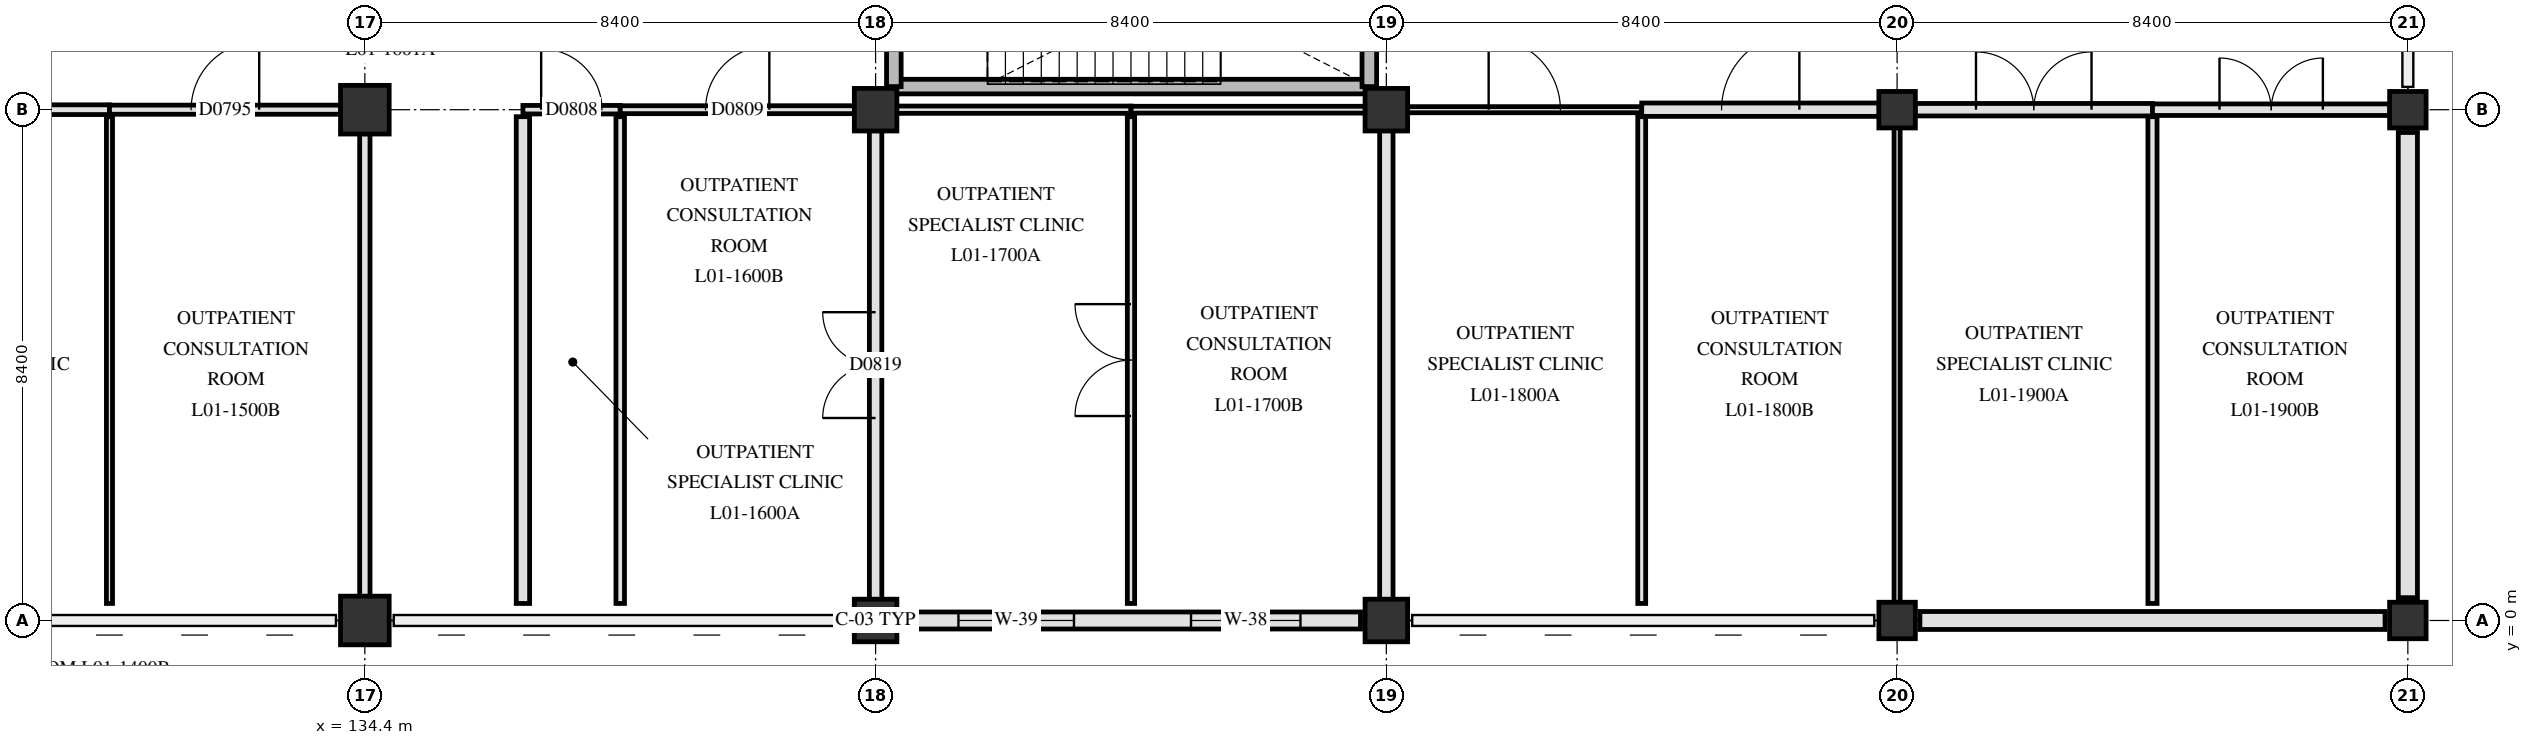
"""IFC4 building model, lengths in metres.
Left out: names, types, materials, properties, quantities, classifications, styles, units other than length and angle.
Written with IfcOpenShell. Run it as: python <this file> out.ifc"""

import sys

from ifc_helpers import new_model, si_unit, direction, frame, frame_2d, origin, origin_2d, place, context, subcontext, project, spatial, rectangle, extrude, element, fill, save


model = new_model("IFC4")
c1 = context("Model", 3, precision=1e-05, world=origin(), true_north=direction((0.0, 1.0)))
c2 = subcontext(c1, "Body", "Model", "MODEL_VIEW")
j1 = project(units=[si_unit("LENGTHUNIT", "METRE"), si_unit("PLANEANGLEUNIT", "RADIAN")], contexts=[c1])
p1 = place(None, origin())
s1 = spatial("IfcSite", under=j1, at=p1, CompositionType="ELEMENT")
p2 = place(p1, origin())
s2 = spatial("IfcBuilding", under=s1, at=p2, CompositionType="ELEMENT")
p3 = place(p2, frame((0.0, 0.0, 4.8)))
s3 = spatial("IfcBuildingStorey", under=s2, at=p3, CompositionType="ELEMENT", Elevation=4.8)
for number, where, z_axis, x_axis in (
    (1, (134.4, 0.0, 0.0), (0.0, 0.0, 1.0), (1.0, 0.0, 0.0)),
    (2, (134.4, 8.4, 0.0), (0.0, 0.0, 1.0), (1.0, 0.0, 0.0)),
):
    element("IfcColumn", number, at=place(p3, frame(where, z_axis=z_axis, x_axis=x_axis)), inside=s3, PredefinedType="COLUMN", context=c2, shape_type="SweptSolid", body=[
        extrude(rectangle(XDim=0.8, YDim=0.8, at=origin_2d()), origin(), (0.0, 0.0, 1.0), 4.5),
    ])
for number, where, z_axis, x_axis in (
    (3, (142.8, 0.0, 0.0), (0.0, 0.0, 1.0), (1.0, 0.0, 0.0)),
    (4, (142.8, 8.4, 0.0), (0.0, 0.0, 1.0), (1.0, 0.0, 0.0)),
    (5, (151.2, 0.0, 0.0), (0.0, 0.0, 1.0), (1.0, 0.0, 0.0)),
    (6, (151.2, 8.4, 0.0), (0.0, 0.0, 1.0), (1.0, 0.0, 0.0)),
):
    element("IfcColumn", number, at=place(p3, frame(where, z_axis=z_axis, x_axis=x_axis)), inside=s3, PredefinedType="COLUMN", context=c2, shape_type="SweptSolid", body=[
        extrude(rectangle(XDim=0.7, YDim=0.7, at=origin_2d()), origin(), (0.0, 0.0, 1.0), 4.5),
    ])
for number, where, z_axis, x_axis in (
    (7, (159.6, 0.0, 0.0), (0.0, 0.0, 1.0), (1.0, 0.0, 0.0)),
    (8, (159.6, 8.4, 0.0), (0.0, 0.0, 1.0), (1.0, 0.0, 0.0)),
    (9, (168.0, 0.0, 0.0), (0.0, 0.0, 1.0), (1.0, 0.0, 0.0)),
    (10, (168.0, 8.4, 0.0), (0.0, 0.0, 1.0), (1.0, 0.0, 0.0)),
):
    element("IfcColumn", number, at=place(p3, frame(where, z_axis=z_axis, x_axis=x_axis)), inside=s3, PredefinedType="COLUMN", context=c2, shape_type="SweptSolid", body=[
        extrude(rectangle(XDim=0.6, YDim=0.6, at=origin_2d()), origin(), (0.0, 0.0, 1.0), 4.5),
    ])
p4 = place(p3, frame((168.0, 8.025, 0.0), z_axis=(0.0, 0.0, 1.0), x_axis=(0.0, -1.0, 0.0)))
e11 = element("IfcWall", 11, at=p4, inside=s3, PredefinedType="SOLIDWALL", context=c2, shape_type="SweptSolid", body=[
    extrude(rectangle(XDim=7.65, YDim=0.315, at=frame_2d((3.825, 0.0))), origin(), (0.0, 0.0, 1.0), 3.44),
])
p5 = place(p3, frame((167.625, 0.0, 0.0), z_axis=(0.0, 0.0, 1.0), x_axis=(-1.0, 0.0, 0.0)))
e12 = element("IfcWall", 12, at=p5, inside=s3, PredefinedType="SOLIDWALL", context=c2, shape_type="SweptSolid", body=[
    extrude(rectangle(XDim=7.65, YDim=0.295, at=frame_2d((3.825, 0.0))), origin(), (0.0, 0.0, 1.0), 3.44),
])
p6 = place(p3, frame((150.775, 0.0, 0.0), z_axis=(0.0, 0.0, 1.0), x_axis=(-1.0, 0.0, 0.0)))
e13 = element("IfcWall", 13, at=p6, inside=s3, PredefinedType="SOLIDWALL", context=c2, shape_type="SweptSolid", body=[
    extrude(rectangle(XDim=7.55, YDim=0.28, at=frame_2d((3.775, 0.0))), origin(), (0.0, 0.0, 1.0), 3.44),
])
p7 = place(p6, frame((0.988, 0.0, 0.85)))
e14 = element("IfcOpeningElement", 14, at=p7, cuts=e13, PredefinedType="OPENING", context=c2, shape_type="SweptSolid", body=[
    extrude(rectangle(XDim=1.8, YDim=1.66, at=frame_2d((0.9, 0.83))), frame((0.0, 0.15, 0.0), z_axis=(0.0, -1.0, 0.0), x_axis=(1.0, 0.0, 0.0)), (0.0, 0.0, 1.0), 0.3),
])
p8 = place(p6, frame((4.712, 0.0, 0.85)))
e15 = element("IfcOpeningElement", 15, at=p8, cuts=e13, PredefinedType="OPENING", context=c2, shape_type="SweptSolid", body=[
    extrude(rectangle(XDim=1.9, YDim=1.66, at=frame_2d((0.95, 0.83))), frame((0.0, 0.15, 0.0), z_axis=(0.0, -1.0, 0.0), x_axis=(1.0, 0.0, 0.0)), (0.0, 0.0, 1.0), 0.3),
])
p9 = place(p3, frame((143.1, 8.78, 0.0), z_axis=(0.0, 0.0, 1.0), x_axis=(1.0, 0.0, 0.0)))
e16 = element("IfcWall", 16, at=p9, inside=s3, PredefinedType="SHEAR", context=c2, shape_type="SweptSolid", body=[
    extrude(rectangle(XDim=7.82, YDim=0.24, at=frame_2d((3.91, 0.0))), origin(), (0.0, 0.0, 1.0), 4.15),
])
for number, where, z_axis, x_axis in (
    (17, (143.1, 8.78, 0.0), (0.0, 0.0, 1.0), (0.0, 1.0, 0.0)),
    (18, (150.92, 8.78, 0.0), (0.0, 0.0, 1.0), (0.0, 1.0, 0.0)),
):
    element("IfcWall", number, at=place(p3, frame(where, z_axis=z_axis, x_axis=x_axis)), inside=s3, PredefinedType="SHEAR", context=c2, shape_type="SweptSolid", body=[
        extrude(rectangle(XDim=3.32, YDim=0.24, at=frame_2d((1.66, 0.0))), origin(), (0.0, 0.0, 1.0), 4.15),
    ])
p10 = place(p3, frame((126.395, 8.4, 0.0), z_axis=(0.0, 0.0, 1.0), x_axis=(1.0, 0.0, 0.0)))
e19 = element("IfcWall", 19, at=p10, inside=s3, PredefinedType="PARTITIONING", context=c2, shape_type="SweptSolid", body=[
    extrude(rectangle(XDim=3.805, YDim=0.16, at=frame_2d((1.902, 0.0))), origin(), (0.0, 0.0, 1.0), 3.54),
])
p11 = place(p10, frame((1.413, 0.0, 0.0)))
e20 = element("IfcOpeningElement", 20, at=p11, cuts=e19, PredefinedType="OPENING", context=c2, shape_type="SweptSolid", body=[
    extrude(rectangle(XDim=0.98, YDim=2.12, at=frame_2d((0.49, 1.06))), frame((0.0, 0.09, 0.0), z_axis=(0.0, -1.0, 0.0), x_axis=(1.0, 0.0, 0.0)), (0.0, 0.0, 1.0), 0.18),
])
p12 = place(p3, frame((130.2, 8.4, 0.0), z_axis=(0.0, 0.0, 1.0), x_axis=(1.0, 0.0, 0.0)))
e21 = element("IfcWall", 21, at=p12, inside=s3, PredefinedType="PARTITIONING", context=c2, shape_type="SweptSolid", body=[
    extrude(rectangle(XDim=3.805, YDim=0.15, at=frame_2d((1.902, 0.0))), origin(), (0.0, 0.0, 1.0), 3.54),
])
p13 = place(p12, frame((1.343, 0.0, 0.0)))
e22 = element("IfcOpeningElement", 22, at=p13, cuts=e21, PredefinedType="OPENING", context=c2, shape_type="SweptSolid", body=[
    extrude(rectangle(XDim=1.12, YDim=2.18, at=frame_2d((0.56, 1.09))), frame((0.0, 0.085, 0.0), z_axis=(0.0, -1.0, 0.0), x_axis=(1.0, 0.0, 0.0)), (0.0, 0.0, 1.0), 0.17),
])
p14 = place(p3, frame((137.0, 8.4, 0.0), z_axis=(0.0, 0.0, 1.0), x_axis=(1.0, 0.0, 0.0)))
e23 = element("IfcWall", 23, at=p14, inside=s3, PredefinedType="PARTITIONING", context=c2, shape_type="SweptSolid", body=[
    extrude(rectangle(XDim=1.6, YDim=0.14, at=frame_2d((0.8, 0.0))), origin(), (0.0, 0.0, 1.0), 3.54),
])
p15 = place(p14, frame((0.3, 0.0, 0.0)))
e24 = element("IfcOpeningElement", 24, at=p15, cuts=e23, PredefinedType="OPENING", context=c2, shape_type="SweptSolid", body=[
    extrude(rectangle(XDim=1.0, YDim=2.15, at=frame_2d((0.5, 1.075))), frame((0.0, 0.08, 0.0), z_axis=(0.0, -1.0, 0.0), x_axis=(1.0, 0.0, 0.0)), (0.0, 0.0, 1.0), 0.16),
])
p16 = place(p3, frame((138.6, 8.4, 0.0), z_axis=(0.0, 0.0, 1.0), x_axis=(1.0, 0.0, 0.0)))
e25 = element("IfcWall", 25, at=p16, inside=s3, PredefinedType="PARTITIONING", context=c2, shape_type="SweptSolid", body=[
    extrude(rectangle(XDim=3.855, YDim=0.13, at=frame_2d((1.927, 0.0))), origin(), (0.0, 0.0, 1.0), 3.54),
])
p17 = place(p16, frame((1.403, 0.0, 0.0)))
e26 = element("IfcOpeningElement", 26, at=p17, cuts=e25, PredefinedType="OPENING", context=c2, shape_type="SweptSolid", body=[
    extrude(rectangle(XDim=1.05, YDim=2.15, at=frame_2d((0.525, 1.075))), frame((0.0, 0.075, 0.0), z_axis=(0.0, -1.0, 0.0), x_axis=(1.0, 0.0, 0.0)), (0.0, 0.0, 1.0), 0.15),
])
p18 = place(p3, frame((143.145, 8.4, 0.0), z_axis=(0.0, 0.0, 1.0), x_axis=(1.0, 0.0, 0.0)))
e27 = element("IfcWall", 27, at=p18, inside=s3, PredefinedType="PARTITIONING", context=c2, shape_type="SweptSolid", body=[
    extrude(rectangle(XDim=3.855, YDim=0.12, at=frame_2d((1.927, 0.0))), origin(), (0.0, 0.0, 1.0), 3.54),
])
p19 = place(p3, frame((147.0, 8.4, 0.0), z_axis=(0.0, 0.0, 1.0), x_axis=(1.0, 0.0, 0.0)))
e28 = element("IfcWall", 28, at=p19, inside=s3, PredefinedType="PARTITIONING", context=c2, shape_type="SweptSolid", body=[
    extrude(rectangle(XDim=3.855, YDim=0.112, at=frame_2d((1.927, 0.0))), origin(), (0.0, 0.0, 1.0), 3.54),
])
p20 = place(p3, frame((151.545, 8.4, 0.0), z_axis=(0.0, 0.0, 1.0), x_axis=(1.0, 0.0, 0.0)))
e29 = element("IfcWall", 29, at=p20, inside=s3, PredefinedType="PARTITIONING", context=c2, shape_type="SweptSolid", body=[
    extrude(rectangle(XDim=3.855, YDim=0.1, at=frame_2d((1.927, 0.0))), origin(), (0.0, 0.0, 1.0), 3.54),
])
p21 = place(p20, frame((1.337, 0.0, 0.0)))
e30 = element("IfcOpeningElement", 30, at=p21, cuts=e29, PredefinedType="OPENING", context=c2, shape_type="SweptSolid", body=[
    extrude(rectangle(XDim=1.18, YDim=2.18, at=frame_2d((0.59, 1.09))), frame((0.0, 0.06, 0.0), z_axis=(0.0, -1.0, 0.0), x_axis=(1.0, 0.0, 0.0)), (0.0, 0.0, 1.0), 0.12),
])
p22 = place(p3, frame((155.4, 8.4, 0.0), z_axis=(0.0, 0.0, 1.0), x_axis=(1.0, 0.0, 0.0)))
e31 = element("IfcWall", 31, at=p22, inside=s3, PredefinedType="PARTITIONING", context=c2, shape_type="SweptSolid", body=[
    extrude(rectangle(XDim=3.905, YDim=0.22, at=frame_2d((1.953, 0.0))), origin(), (0.0, 0.0, 1.0), 3.54),
])
p23 = place(p22, frame((1.312, 0.0, 0.0)))
e32 = element("IfcOpeningElement", 32, at=p23, cuts=e31, PredefinedType="OPENING", context=c2, shape_type="SweptSolid", body=[
    extrude(rectangle(XDim=1.28, YDim=2.18, at=frame_2d((0.64, 1.09))), frame((0.0, 0.12, 0.0), z_axis=(0.0, -1.0, 0.0), x_axis=(1.0, 0.0, 0.0)), (0.0, 0.0, 1.0), 0.24),
])
p24 = place(p3, frame((159.895, 8.4, 0.0), z_axis=(0.0, 0.0, 1.0), x_axis=(1.0, 0.0, 0.0)))
e33 = element("IfcWall", 33, at=p24, inside=s3, PredefinedType="PARTITIONING", context=c2, shape_type="SweptSolid", body=[
    extrude(rectangle(XDim=3.905, YDim=0.205, at=frame_2d((1.953, 0.0))), origin(), (0.0, 0.0, 1.0), 3.54),
])
p25 = place(p24, frame((1.002, 0.0, 0.0)))
e34 = element("IfcOpeningElement", 34, at=p25, cuts=e33, PredefinedType="OPENING", context=c2, shape_type="SweptSolid", body=[
    extrude(rectangle(XDim=1.9, YDim=2.3, at=frame_2d((0.95, 1.15))), frame((0.0, 0.113, 0.0), z_axis=(0.0, -1.0, 0.0), x_axis=(1.0, 0.0, 0.0)), (0.0, 0.0, 1.0), 0.225),
])
p26 = place(p3, frame((163.8, 8.4, 0.0), z_axis=(0.0, 0.0, 1.0), x_axis=(1.0, 0.0, 0.0)))
e35 = element("IfcWall", 35, at=p26, inside=s3, PredefinedType="PARTITIONING", context=c2, shape_type="SweptSolid", body=[
    extrude(rectangle(XDim=3.905, YDim=0.19, at=frame_2d((1.953, 0.0))), origin(), (0.0, 0.0, 1.0), 3.54),
])
p27 = place(p26, frame((1.103, 0.0, 0.0)))
e36 = element("IfcOpeningElement", 36, at=p27, cuts=e35, PredefinedType="OPENING", context=c2, shape_type="SweptSolid", body=[
    extrude(rectangle(XDim=1.7, YDim=2.25, at=frame_2d((0.85, 1.125))), frame((0.0, 0.105, 0.0), z_axis=(0.0, -1.0, 0.0), x_axis=(1.0, 0.0, 0.0)), (0.0, 0.0, 1.0), 0.21),
])
p28 = place(p3, frame((130.2, 0.28, 0.0), z_axis=(0.0, 0.0, 1.0), x_axis=(0.0, 1.0, 0.0)))
e37 = element("IfcWall", 37, at=p28, inside=s3, PredefinedType="PARTITIONING", context=c2, shape_type="SweptSolid", body=[
    extrude(rectangle(XDim=8.005, YDim=0.1, at=frame_2d((4.002, 0.0))), origin(), (0.0, 0.0, 1.0), 3.54),
])
p29 = place(p3, frame((134.4, 0.395, 0.0), z_axis=(0.0, 0.0, 1.0), x_axis=(0.0, 1.0, 0.0)))
e38 = element("IfcWall", 38, at=p29, inside=s3, PredefinedType="PARTITIONING", context=c2, shape_type="SweptSolid", body=[
    extrude(rectangle(XDim=7.61, YDim=0.17, at=frame_2d((3.805, 0.0))), origin(), (0.0, 0.0, 1.0), 3.59),
])
p30 = place(p3, frame((137.0, 0.28, 0.0), z_axis=(0.0, 0.0, 1.0), x_axis=(0.0, 1.0, 0.0)))
e39 = element("IfcWall", 39, at=p30, inside=s3, PredefinedType="PARTITIONING", context=c2, shape_type="SweptSolid", body=[
    extrude(rectangle(XDim=8.005, YDim=0.22, at=frame_2d((4.002, 0.0))), origin(), (0.0, 0.0, 1.0), 3.54),
])
p31 = place(p3, frame((138.6, 0.28, 0.0), z_axis=(0.0, 0.0, 1.0), x_axis=(0.0, 1.0, 0.0)))
e40 = element("IfcWall", 40, at=p31, inside=s3, PredefinedType="PARTITIONING", context=c2, shape_type="SweptSolid", body=[
    extrude(rectangle(XDim=8.005, YDim=0.14, at=frame_2d((4.002, 0.0))), origin(), (0.0, 0.0, 1.0), 3.54),
])
p32 = place(p3, frame((142.8, 0.345, 0.0), z_axis=(0.0, 0.0, 1.0), x_axis=(0.0, 1.0, 0.0)))
e41 = element("IfcWall", 41, at=p32, inside=s3, PredefinedType="PARTITIONING", context=c2, shape_type="SweptSolid", body=[
    extrude(rectangle(XDim=7.71, YDim=0.205, at=frame_2d((3.855, 0.0))), origin(), (0.0, 0.0, 1.0), 3.59),
])
p33 = place(p32, frame((2.985, 0.0, 0.0)))
e42 = element("IfcOpeningElement", 42, at=p33, cuts=e41, PredefinedType="OPENING", context=c2, shape_type="SweptSolid", body=[
    extrude(rectangle(XDim=1.74, YDim=2.24, at=frame_2d((0.87, 1.12))), frame((0.0, 0.113, 0.0), z_axis=(0.0, -1.0, 0.0), x_axis=(1.0, 0.0, 0.0)), (0.0, 0.0, 1.0), 0.225),
])
p34 = place(p3, frame((147.0, 0.28, 0.0), z_axis=(0.0, 0.0, 1.0), x_axis=(0.0, 1.0, 0.0)))
e43 = element("IfcWall", 43, at=p34, inside=s3, PredefinedType="PARTITIONING", context=c2, shape_type="SweptSolid", body=[
    extrude(rectangle(XDim=8.005, YDim=0.12, at=frame_2d((4.002, 0.0))), origin(), (0.0, 0.0, 1.0), 3.54),
])
p35 = place(p34, frame((3.083, 0.0, 0.0)))
e44 = element("IfcOpeningElement", 44, at=p35, cuts=e43, PredefinedType="OPENING", context=c2, shape_type="SweptSolid", body=[
    extrude(rectangle(XDim=1.84, YDim=2.28, at=frame_2d((0.92, 1.14))), frame((0.0, 0.07, 0.0), z_axis=(0.0, -1.0, 0.0), x_axis=(1.0, 0.0, 0.0)), (0.0, 0.0, 1.0), 0.14),
])
p36 = place(p3, frame((151.2, 0.345, 0.0), z_axis=(0.0, 0.0, 1.0), x_axis=(0.0, 1.0, 0.0)))
e45 = element("IfcWall", 45, at=p36, inside=s3, PredefinedType="PARTITIONING", context=c2, shape_type="SweptSolid", body=[
    extrude(rectangle(XDim=7.71, YDim=0.22, at=frame_2d((3.855, 0.0))), origin(), (0.0, 0.0, 1.0), 3.59),
])
p37 = place(p3, frame((155.4, 0.28, 0.0), z_axis=(0.0, 0.0, 1.0), x_axis=(0.0, 1.0, 0.0)))
e46 = element("IfcWall", 46, at=p37, inside=s3, PredefinedType="PARTITIONING", context=c2, shape_type="SweptSolid", body=[
    extrude(rectangle(XDim=8.005, YDim=0.13, at=frame_2d((4.002, 0.0))), origin(), (0.0, 0.0, 1.0), 3.54),
])
p38 = place(p3, frame((159.6, 0.295, 0.0), z_axis=(0.0, 0.0, 1.0), x_axis=(0.0, 1.0, 0.0)))
e47 = element("IfcWall", 47, at=p38, inside=s3, PredefinedType="PARTITIONING", context=c2, shape_type="SweptSolid", body=[
    extrude(rectangle(XDim=7.81, YDim=0.1, at=frame_2d((3.905, 0.0))), origin(), (0.0, 0.0, 1.0), 3.59),
])
p39 = place(p3, frame((163.8, 0.28, 0.0), z_axis=(0.0, 0.0, 1.0), x_axis=(0.0, 1.0, 0.0)))
e48 = element("IfcWall", 48, at=p39, inside=s3, PredefinedType="PARTITIONING", context=c2, shape_type="SweptSolid", body=[
    extrude(rectangle(XDim=8.005, YDim=0.15, at=frame_2d((4.002, 0.0))), origin(), (0.0, 0.0, 1.0), 3.54),
])
p40 = place(p7, origin())
e49 = element("IfcWindow", 49, at=p40, inside=s3, PartitioningType="SINGLE_PANEL", PredefinedType="WINDOW", context=c2, shape_type="SweptSolid", body=[
    extrude(rectangle(XDim=1.8, YDim=1.66, at=frame_2d((0.9, 0.83))), frame((0.0, 0.03, 0.0), z_axis=(0.0, -1.0, 0.0), x_axis=(1.0, 0.0, 0.0)), (0.0, 0.0, 1.0), 0.06),
])
fill(e14, e49)
p41 = place(p8, origin())
e50 = element("IfcWindow", 50, at=p41, inside=s3, PartitioningType="SINGLE_PANEL", PredefinedType="WINDOW", context=c2, shape_type="SweptSolid", body=[
    extrude(rectangle(XDim=1.9, YDim=1.66, at=frame_2d((0.95, 0.83))), frame((0.0, 0.03, 0.0), z_axis=(0.0, -1.0, 0.0), x_axis=(1.0, 0.0, 0.0)), (0.0, 0.0, 1.0), 0.06),
])
fill(e15, e50)
p42 = place(p13, origin())
e51 = element("IfcDoor", 51, at=p42, inside=s3, OperationType="SINGLE_SWING_RIGHT", PredefinedType="DOOR", context=c2, shape_type="SweptSolid", body=[
    extrude(rectangle(XDim=1.12, YDim=2.18, at=frame_2d((0.56, 1.09))), frame((0.0, 0.025, 0.0), z_axis=(0.0, -1.0, 0.0), x_axis=(1.0, 0.0, 0.0)), (0.0, 0.0, 1.0), 0.05),
])
fill(e22, e51)
p43 = place(p15, origin())
e52 = element("IfcDoor", 52, at=p43, inside=s3, OperationType="SINGLE_SWING_LEFT", PredefinedType="DOOR", context=c2, shape_type="SweptSolid", body=[
    extrude(rectangle(XDim=1.0, YDim=2.15, at=frame_2d((0.5, 1.075))), frame((0.0, 0.025, 0.0), z_axis=(0.0, -1.0, 0.0), x_axis=(1.0, 0.0, 0.0)), (0.0, 0.0, 1.0), 0.05),
])
fill(e24, e52)
p44 = place(p17, origin())
e53 = element("IfcDoor", 53, at=p44, inside=s3, OperationType="SINGLE_SWING_RIGHT", PredefinedType="DOOR", context=c2, shape_type="SweptSolid", body=[
    extrude(rectangle(XDim=1.05, YDim=2.15, at=frame_2d((0.525, 1.075))), frame((0.0, 0.025, 0.0), z_axis=(0.0, -1.0, 0.0), x_axis=(1.0, 0.0, 0.0)), (0.0, 0.0, 1.0), 0.05),
])
fill(e26, e53)
p45 = place(p33, origin())
e54 = element("IfcDoor", 54, at=p45, inside=s3, OperationType="DOUBLE_SWING_RIGHT", PredefinedType="DOOR", context=c2, shape_type="SweptSolid", body=[
    extrude(rectangle(XDim=1.74, YDim=2.24, at=frame_2d((0.87, 1.12))), frame((0.0, 0.025, 0.0), z_axis=(0.0, -1.0, 0.0), x_axis=(1.0, 0.0, 0.0)), (0.0, 0.0, 1.0), 0.05),
])
fill(e42, e54)
p46 = place(p35, origin())
e55 = element("IfcDoor", 55, at=p46, inside=s3, OperationType="DOUBLE_SWING_LEFT", PredefinedType="DOOR", context=c2, shape_type="SweptSolid", body=[
    extrude(rectangle(XDim=1.84, YDim=2.28, at=frame_2d((0.92, 1.14))), frame((0.0, 0.025, 0.0), z_axis=(0.0, -1.0, 0.0), x_axis=(1.0, 0.0, 0.0)), (0.0, 0.0, 1.0), 0.05),
])
fill(e44, e55)
p47 = place(p21, origin())
e56 = element("IfcDoor", 56, at=p47, inside=s3, OperationType="SINGLE_SWING_LEFT", PredefinedType="DOOR", context=c2, shape_type="SweptSolid", body=[
    extrude(rectangle(XDim=1.18, YDim=2.18, at=frame_2d((0.59, 1.09))), frame((0.0, 0.025, 0.0), z_axis=(0.0, -1.0, 0.0), x_axis=(1.0, 0.0, 0.0)), (0.0, 0.0, 1.0), 0.05),
])
fill(e30, e56)
p48 = place(p23, origin())
e57 = element("IfcDoor", 57, at=p48, inside=s3, OperationType="SINGLE_SWING_RIGHT", PredefinedType="DOOR", context=c2, shape_type="SweptSolid", body=[
    extrude(rectangle(XDim=1.28, YDim=2.18, at=frame_2d((0.64, 1.09))), frame((0.0, 0.025, 0.0), z_axis=(0.0, -1.0, 0.0), x_axis=(1.0, 0.0, 0.0)), (0.0, 0.0, 1.0), 0.05),
])
fill(e32, e57)
p49 = place(p25, origin())
e58 = element("IfcDoor", 58, at=p49, inside=s3, OperationType="DOUBLE_SWING_LEFT", PredefinedType="DOOR", context=c2, shape_type="SweptSolid", body=[
    extrude(rectangle(XDim=1.9, YDim=2.3, at=frame_2d((0.95, 1.15))), frame((0.0, 0.025, 0.0), z_axis=(0.0, -1.0, 0.0), x_axis=(1.0, 0.0, 0.0)), (0.0, 0.0, 1.0), 0.05),
])
fill(e34, e58)
p50 = place(p27, origin())
e59 = element("IfcDoor", 59, at=p50, inside=s3, OperationType="DOUBLE_SWING_RIGHT", PredefinedType="DOOR", context=c2, shape_type="SweptSolid", body=[
    extrude(rectangle(XDim=1.7, YDim=2.25, at=frame_2d((0.85, 1.125))), frame((0.0, 0.025, 0.0), z_axis=(0.0, -1.0, 0.0), x_axis=(1.0, 0.0, 0.0)), (0.0, 0.0, 1.0), 0.05),
])
fill(e36, e59)
save(model, sys.argv[1])
